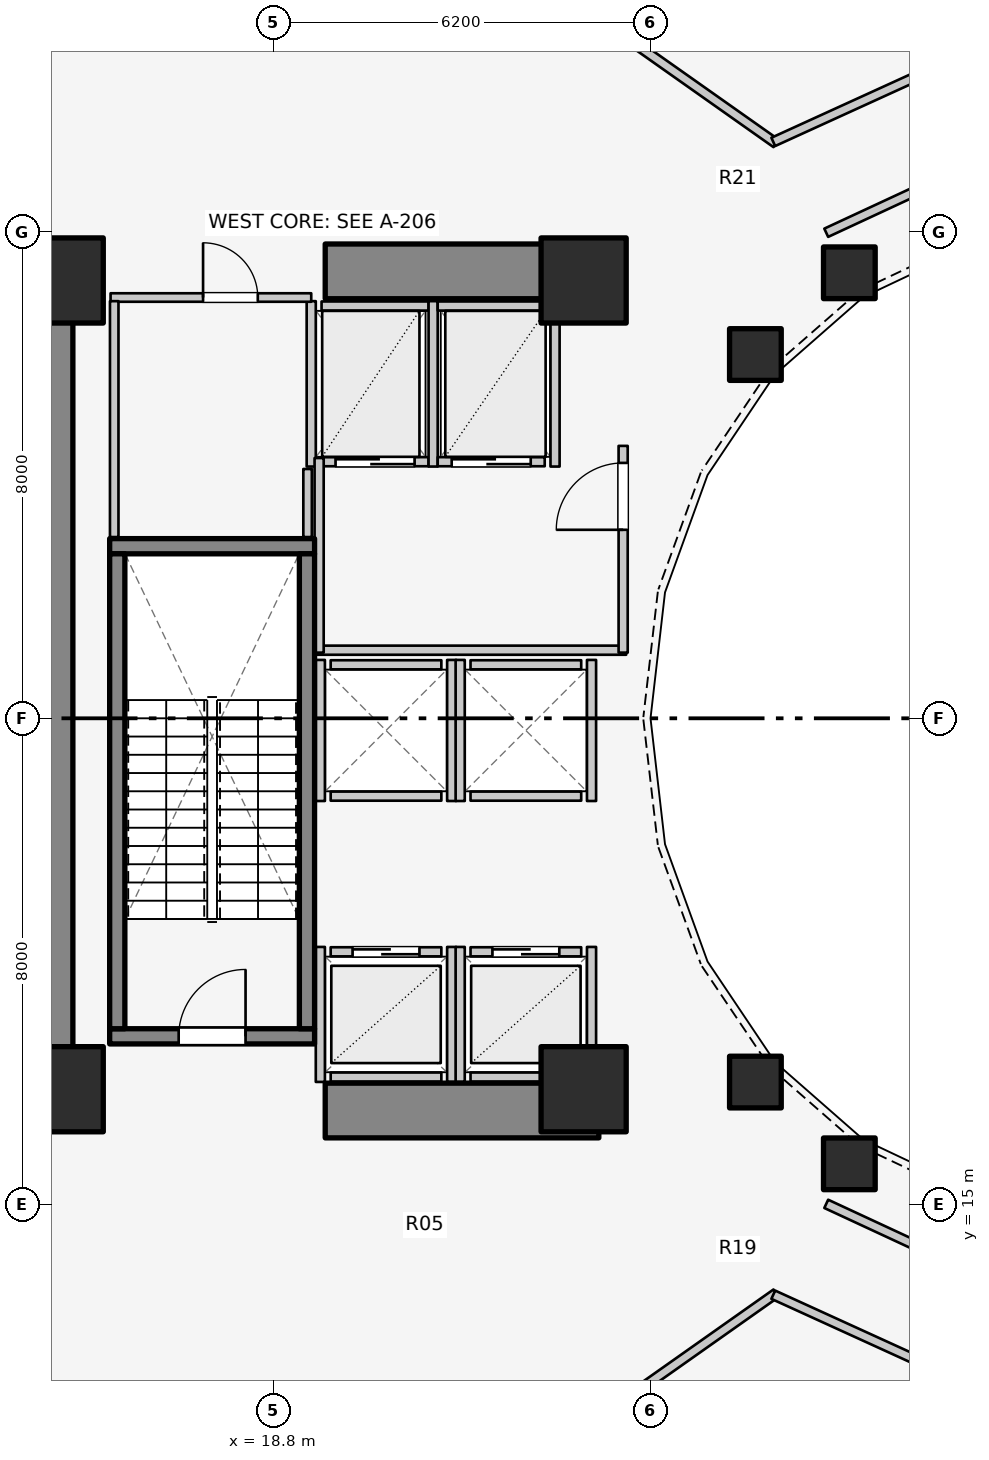
"""IFC4 building model, lengths in metres.
Left out: names, types, materials, properties, quantities, classifications, styles, units other than length and angle.
Written with IfcOpenShell. Run it as: python <this file> out.ifc"""

import sys

from ifc_helpers import new_model, si_unit, direction, frame, frame_2d, origin, origin_2d, place, context, subcontext, project, spatial, rectangle, extrude, element, fill, save


model = new_model("IFC4")
c1 = context("Model", 3, precision=1e-05, world=origin(), true_north=direction((0.0, 1.0)))
c2 = subcontext(c1, "Body", "Model", "MODEL_VIEW")
j1 = project(units=[si_unit("LENGTHUNIT", "METRE"), si_unit("PLANEANGLEUNIT", "RADIAN")], contexts=[c1])
p1 = place(None, origin())
s1 = spatial("IfcSite", under=j1, at=p1, CompositionType="ELEMENT")
p2 = place(p1, origin())
s2 = spatial("IfcBuilding", under=s1, at=p2, CompositionType="ELEMENT")
p3 = place(p2, frame((0.0, 0.0, 69.0)))
s3 = spatial("IfcBuildingStorey", under=s2, at=p3, CompositionType="ELEMENT", Elevation=69.0)
p4 = place(p3, frame((15.05, 17.05, 0.0), z_axis=(0.0, 0.0, 1.0), x_axis=(0.0, 1.0, 0.0)))
e1 = element("IfcWall", 1, at=p4, inside=s3, PredefinedType="SHEAR", context=c2, shape_type="SweptSolid", body=[
    extrude(rectangle(XDim=12.8, YDim=0.9, at=frame_2d((6.4, 0.0))), origin(), (0.0, 0.0, 1.0), 4.2),
])
for number, where, z_axis, x_axis in (
    (2, (19.65, 16.55, 0.0), (0.0, 0.0, 1.0), (1.0, 0.0, 0.0)),
    (3, (19.65, 30.35, 0.0), (0.0, 0.0, 1.0), (1.0, 0.0, 0.0)),
):
    element("IfcWall", number, at=place(p3, frame(where, z_axis=z_axis, x_axis=x_axis)), inside=s3, PredefinedType="SHEAR", context=c2, shape_type="SweptSolid", body=[
        extrude(rectangle(XDim=4.5, YDim=0.9, at=frame_2d((2.25, 0.0))), origin(), (0.0, 0.0, 1.0), 4.2),
    ])
p5 = place(p3, frame((16.105, 17.77, 0.0), z_axis=(0.0, 0.0, 1.0), x_axis=(1.0, 0.0, 0.0)))
e4 = element("IfcWall", 4, at=p5, inside=s3, PredefinedType="SOLIDWALL", context=c2, shape_type="SweptSolid", body=[
    extrude(rectangle(XDim=3.37, YDim=0.25, at=frame_2d((1.685, 0.0))), origin(), (0.0, 0.0, 1.0), 4.2),
])
p6 = place(p5, frame((1.135, 0.0, 0.0)))
e5 = element("IfcOpeningElement", 5, at=p6, cuts=e4, PredefinedType="OPENING", context=c2, shape_type="SweptSolid", body=[
    extrude(rectangle(XDim=1.1, YDim=2.1, at=frame_2d((0.55, 1.05))), frame((0.0, 0.135, 0.0), z_axis=(0.0, -1.0, 0.0), x_axis=(1.0, 0.0, 0.0)), (0.0, 0.0, 1.0), 0.27),
])
p7 = place(p3, frame((16.105, 25.83, 0.0), z_axis=(0.0, 0.0, 1.0), x_axis=(1.0, 0.0, 0.0)))
e6 = element("IfcWall", 6, at=p7, inside=s3, PredefinedType="SOLIDWALL", context=c2, shape_type="SweptSolid", body=[
    extrude(rectangle(XDim=3.37, YDim=0.25, at=frame_2d((1.685, 0.0))), origin(), (0.0, 0.0, 1.0), 4.2),
])
for number, where, z_axis, x_axis in (
    (7, (16.23, 17.895, 0.0), (0.0, 0.0, 1.0), (0.0, 1.0, 0.0)),
    (8, (19.35, 17.895, 0.0), (0.0, 0.0, 1.0), (0.0, 1.0, 0.0)),
):
    element("IfcWall", number, at=place(p3, frame(where, z_axis=z_axis, x_axis=x_axis)), inside=s3, PredefinedType="SOLIDWALL", context=c2, shape_type="SweptSolid", body=[
        extrude(rectangle(XDim=7.81, YDim=0.25, at=frame_2d((3.905, 0.0))), origin(), (0.0, 0.0, 1.0), 4.2),
    ])
for number, where, z_axis, x_axis in (
    (9, (15.3, 16.9, 0.0), (0.0, 0.0, 1.0), (1.0, 0.0, 0.0)),
    (10, (23.9, 16.9, 0.0), (0.0, 0.0, 1.0), (1.0, 0.0, 0.0)),
    (11, (23.9, 30.2, 0.0), (0.0, 0.0, 1.0), (1.0, 0.0, 0.0)),
    (12, (15.3, 30.2, 0.0), (0.0, 0.0, 1.0), (1.0, 0.0, 0.0)),
):
    element("IfcColumn", number, at=place(p3, frame(where, z_axis=z_axis, x_axis=x_axis)), inside=s3, PredefinedType="COLUMN", context=c2, shape_type="SweptSolid", body=[
        extrude(rectangle(XDim=1.4, YDim=1.4, at=origin_2d()), origin(), (0.0, 0.0, 1.0), 4.2),
    ])
for number, where, z_axis, x_axis in (
    (13, (28.27, 30.327, 0.0), (0.0, 0.0, 1.0), (1.0, 0.0, 0.0)),
    (14, (26.725, 28.982, 0.0), (0.0, 0.0, 1.0), (1.0, 0.0, 0.0)),
    (15, (26.725, 17.018, 0.0), (0.0, 0.0, 1.0), (1.0, 0.0, 0.0)),
    (16, (28.27, 15.673, 0.0), (0.0, 0.0, 1.0), (1.0, 0.0, 0.0)),
):
    element("IfcColumn", number, at=place(p3, frame(where, z_axis=z_axis, x_axis=x_axis)), inside=s3, PredefinedType="COLUMN", context=c2, shape_type="SweptSolid", body=[
        extrude(rectangle(XDim=0.85, YDim=0.85, at=origin_2d()), origin(), (0.0, 0.0, 1.0), 4.2),
    ])
p8 = place(p3, frame((19.74, 19.16, 0.0), z_axis=(0.0, 0.0, 1.0), x_axis=(1.0, 0.0, 0.0)))
e17 = element("IfcWall", 17, at=p8, inside=s3, PredefinedType="SOLIDWALL", context=c2, shape_type="SweptSolid", body=[
    extrude(rectangle(XDim=1.82, YDim=0.15, at=frame_2d((0.91, 0.0))), origin(), (0.0, 0.0, 1.0), 3.675),
])
p9 = place(p8, frame((0.36, 0.0, 0.0)))
e18 = element("IfcOpeningElement", 18, at=p9, cuts=e17, PredefinedType="OPENING", context=c2, shape_type="SweptSolid", body=[
    extrude(rectangle(XDim=1.1, YDim=2.1, at=frame_2d((0.55, 1.05))), frame((0.0, 0.085, 0.0), z_axis=(0.0, -1.0, 0.0), x_axis=(1.0, 0.0, 0.0)), (0.0, 0.0, 1.0), 0.17),
])
p10 = place(p3, frame((19.74, 17.1, 0.0), z_axis=(0.0, 0.0, 1.0), x_axis=(1.0, 0.0, 0.0)))
e19 = element("IfcWall", 19, at=p10, inside=s3, PredefinedType="SOLIDWALL", context=c2, shape_type="SweptSolid", body=[
    extrude(rectangle(XDim=1.82, YDim=0.15, at=frame_2d((0.91, 0.0))), origin(), (0.0, 0.0, 1.0), 3.675),
])
p11 = place(p3, frame((19.57, 17.02, 0.0), z_axis=(0.0, 0.0, 1.0), x_axis=(0.0, 1.0, 0.0)))
e20 = element("IfcWall", 20, at=p11, inside=s3, PredefinedType="SOLIDWALL", context=c2, shape_type="SweptSolid", body=[
    extrude(rectangle(XDim=2.22, YDim=0.15, at=frame_2d((1.11, 0.0))), origin(), (0.0, 0.0, 1.0), 3.22),
])
p12 = place(p3, frame((21.73, 17.02, 0.0), z_axis=(0.0, 0.0, 1.0), x_axis=(0.0, 1.0, 0.0)))
e21 = element("IfcWall", 21, at=p12, inside=s3, PredefinedType="SOLIDWALL", context=c2, shape_type="SweptSolid", body=[
    extrude(rectangle(XDim=2.22, YDim=0.15, at=frame_2d((1.11, 0.0))), origin(), (0.0, 0.0, 1.0), 3.675),
])
p13 = place(p3, frame((22.04, 19.16, 0.0), z_axis=(0.0, 0.0, 1.0), x_axis=(1.0, 0.0, 0.0)))
e22 = element("IfcWall", 22, at=p13, inside=s3, PredefinedType="SOLIDWALL", context=c2, shape_type="SweptSolid", body=[
    extrude(rectangle(XDim=1.82, YDim=0.15, at=frame_2d((0.91, 0.0))), origin(), (0.0, 0.0, 1.0), 3.22),
])
p14 = place(p13, frame((0.36, 0.0, 0.0)))
e23 = element("IfcOpeningElement", 23, at=p14, cuts=e22, PredefinedType="OPENING", context=c2, shape_type="SweptSolid", body=[
    extrude(rectangle(XDim=1.1, YDim=2.1, at=frame_2d((0.55, 1.05))), frame((0.0, 0.085, 0.0), z_axis=(0.0, -1.0, 0.0), x_axis=(1.0, 0.0, 0.0)), (0.0, 0.0, 1.0), 0.17),
])
p15 = place(p3, frame((22.04, 17.1, 0.0), z_axis=(0.0, 0.0, 1.0), x_axis=(1.0, 0.0, 0.0)))
e24 = element("IfcWall", 24, at=p15, inside=s3, PredefinedType="SOLIDWALL", context=c2, shape_type="SweptSolid", body=[
    extrude(rectangle(XDim=1.82, YDim=0.15, at=frame_2d((0.91, 0.0))), origin(), (0.0, 0.0, 1.0), 3.22),
])
p16 = place(p3, frame((21.87, 17.02, 0.0), z_axis=(0.0, 0.0, 1.0), x_axis=(0.0, 1.0, 0.0)))
e25 = element("IfcWall", 25, at=p16, inside=s3, PredefinedType="SOLIDWALL", context=c2, shape_type="SweptSolid", body=[
    extrude(rectangle(XDim=2.22, YDim=0.15, at=frame_2d((1.11, 0.0))), origin(), (0.0, 0.0, 1.0), 3.675),
])
p17 = place(p3, frame((24.03, 17.02, 0.0), z_axis=(0.0, 0.0, 1.0), x_axis=(0.0, 1.0, 0.0)))
e26 = element("IfcWall", 26, at=p17, inside=s3, PredefinedType="SOLIDWALL", context=c2, shape_type="SweptSolid", body=[
    extrude(rectangle(XDim=2.22, YDim=0.15, at=frame_2d((1.11, 0.0))), origin(), (0.0, 0.0, 1.0), 2.973),
])
for number, where, z_axis, x_axis in (
    (27, (19.74, 21.72, 0.0), (0.0, 0.0, 1.0), (1.0, 0.0, 0.0)),
    (28, (19.74, 23.88, 0.0), (0.0, 0.0, 1.0), (1.0, 0.0, 0.0)),
):
    element("IfcWall", number, at=place(p3, frame(where, z_axis=z_axis, x_axis=x_axis)), inside=s3, PredefinedType="SOLIDWALL", context=c2, shape_type="SweptSolid", body=[
        extrude(rectangle(XDim=1.82, YDim=0.15, at=frame_2d((0.91, 0.0))), origin(), (0.0, 0.0, 1.0), 3.675),
    ])
for number, where, z_axis, x_axis in (
    (29, (19.57, 21.64, 0.0), (0.0, 0.0, 1.0), (0.0, 1.0, 0.0)),
    (30, (21.73, 21.64, 0.0), (0.0, 0.0, 1.0), (0.0, 1.0, 0.0)),
):
    element("IfcWall", number, at=place(p3, frame(where, z_axis=z_axis, x_axis=x_axis)), inside=s3, PredefinedType="SOLIDWALL", context=c2, shape_type="SweptSolid", body=[
        extrude(rectangle(XDim=2.32, YDim=0.15, at=frame_2d((1.16, 0.0))), origin(), (0.0, 0.0, 1.0), 3.675),
    ])
for number, where, z_axis, x_axis in (
    (31, (22.04, 21.72, 0.0), (0.0, 0.0, 1.0), (1.0, 0.0, 0.0)),
    (32, (22.04, 23.88, 0.0), (0.0, 0.0, 1.0), (1.0, 0.0, 0.0)),
):
    element("IfcWall", number, at=place(p3, frame(where, z_axis=z_axis, x_axis=x_axis)), inside=s3, PredefinedType="SOLIDWALL", context=c2, shape_type="SweptSolid", body=[
        extrude(rectangle(XDim=1.82, YDim=0.15, at=frame_2d((0.91, 0.0))), origin(), (0.0, 0.0, 1.0), 3.22),
    ])
p18 = place(p3, frame((21.87, 21.64, 0.0), z_axis=(0.0, 0.0, 1.0), x_axis=(0.0, 1.0, 0.0)))
e33 = element("IfcWall", 33, at=p18, inside=s3, PredefinedType="SOLIDWALL", context=c2, shape_type="SweptSolid", body=[
    extrude(rectangle(XDim=2.32, YDim=0.15, at=frame_2d((1.16, 0.0))), origin(), (0.0, 0.0, 1.0), 3.675),
])
p19 = place(p3, frame((24.03, 21.64, 0.0), z_axis=(0.0, 0.0, 1.0), x_axis=(0.0, 1.0, 0.0)))
e34 = element("IfcWall", 34, at=p19, inside=s3, PredefinedType="SOLIDWALL", context=c2, shape_type="SweptSolid", body=[
    extrude(rectangle(XDim=2.32, YDim=0.15, at=frame_2d((1.16, 0.0))), origin(), (0.0, 0.0, 1.0), 3.22),
])
p20 = place(p3, frame((19.59, 27.22, 0.0), z_axis=(0.0, 0.0, 1.0), x_axis=(1.0, 0.0, 0.0)))
e35 = element("IfcWall", 35, at=p20, inside=s3, PredefinedType="SOLIDWALL", context=c2, shape_type="SweptSolid", body=[
    extrude(rectangle(XDim=1.76, YDim=0.15, at=frame_2d((0.88, 0.0))), origin(), (0.0, 0.0, 1.0), 3.675),
])
p21 = place(p20, frame((0.23, 0.0, 0.0)))
e36 = element("IfcOpeningElement", 36, at=p21, cuts=e35, PredefinedType="OPENING", context=c2, shape_type="SweptSolid", body=[
    extrude(rectangle(XDim=1.3, YDim=2.1, at=frame_2d((0.65, 1.05))), frame((0.0, 0.085, 0.0), z_axis=(0.0, -1.0, 0.0), x_axis=(1.0, 0.0, 0.0)), (0.0, 0.0, 1.0), 0.17),
])
p22 = place(p3, frame((19.59, 29.78, 0.0), z_axis=(0.0, 0.0, 1.0), x_axis=(1.0, 0.0, 0.0)))
e37 = element("IfcWall", 37, at=p22, inside=s3, PredefinedType="SOLIDWALL", context=c2, shape_type="SweptSolid", body=[
    extrude(rectangle(XDim=1.76, YDim=0.15, at=frame_2d((0.88, 0.0))), origin(), (0.0, 0.0, 1.0), 3.675),
])
for number, where, z_axis, x_axis in (
    (38, (19.42, 27.14, 0.0), (0.0, 0.0, 1.0), (0.0, 1.0, 0.0)),
    (39, (21.425, 27.14, 0.0), (0.0, 0.0, 1.0), (0.0, 1.0, 0.0)),
):
    element("IfcWall", number, at=place(p3, frame(where, z_axis=z_axis, x_axis=x_axis)), inside=s3, PredefinedType="SOLIDWALL", context=c2, shape_type="SweptSolid", body=[
        extrude(rectangle(XDim=2.72, YDim=0.15, at=frame_2d((1.36, 0.0))), origin(), (0.0, 0.0, 1.0), 3.675),
    ])
p23 = place(p3, frame((21.5, 27.22, 0.0), z_axis=(0.0, 0.0, 1.0), x_axis=(1.0, 0.0, 0.0)))
e40 = element("IfcWall", 40, at=p23, inside=s3, PredefinedType="SOLIDWALL", context=c2, shape_type="SweptSolid", body=[
    extrude(rectangle(XDim=1.76, YDim=0.15, at=frame_2d((0.88, 0.0))), origin(), (0.0, 0.0, 1.0), 3.675),
])
p24 = place(p23, frame((0.23, 0.0, 0.0)))
e41 = element("IfcOpeningElement", 41, at=p24, cuts=e40, PredefinedType="OPENING", context=c2, shape_type="SweptSolid", body=[
    extrude(rectangle(XDim=1.3, YDim=2.1, at=frame_2d((0.65, 1.05))), frame((0.0, 0.085, 0.0), z_axis=(0.0, -1.0, 0.0), x_axis=(1.0, 0.0, 0.0)), (0.0, 0.0, 1.0), 0.17),
])
p25 = place(p3, frame((21.5, 29.78, 0.0), z_axis=(0.0, 0.0, 1.0), x_axis=(1.0, 0.0, 0.0)))
e42 = element("IfcWall", 42, at=p25, inside=s3, PredefinedType="SOLIDWALL", context=c2, shape_type="SweptSolid", body=[
    extrude(rectangle(XDim=1.76, YDim=0.15, at=frame_2d((0.88, 0.0))), origin(), (0.0, 0.0, 1.0), 3.675),
])
p26 = place(p3, frame((23.43, 27.14, 0.0), z_axis=(0.0, 0.0, 1.0), x_axis=(0.0, 1.0, 0.0)))
e43 = element("IfcWall", 43, at=p26, inside=s3, PredefinedType="SOLIDWALL", context=c2, shape_type="SweptSolid", body=[
    extrude(rectangle(XDim=2.72, YDim=0.15, at=frame_2d((1.36, 0.0))), origin(), (0.0, 0.0, 1.0), 3.675),
])
p27 = place(p3, frame((19.52, 24.12, 0.0), z_axis=(0.0, 0.0, 1.0), x_axis=(1.0, 0.0, 0.0)))
e44 = element("IfcWall", 44, at=p27, inside=s3, PredefinedType="PARTITIONING", context=c2, shape_type="SweptSolid", body=[
    extrude(rectangle(XDim=5.08, YDim=0.15, at=frame_2d((2.54, 0.0))), origin(), (0.0, 0.0, 1.0), 3.22),
])
p28 = place(p3, frame((19.55, 24.08, 0.0), z_axis=(0.0, 0.0, 1.0), x_axis=(0.0, 1.0, 0.0)))
e45 = element("IfcWall", 45, at=p28, inside=s3, PredefinedType="PARTITIONING", context=c2, shape_type="SweptSolid", body=[
    extrude(rectangle(XDim=3.2, YDim=0.15, at=frame_2d((1.6, 0.0))), origin(), (0.0, 0.0, 1.0), 3.675),
])
p29 = place(p3, frame((24.55, 24.08, 0.0), z_axis=(0.0, 0.0, 1.0), x_axis=(0.0, 1.0, 0.0)))
e46 = element("IfcWall", 46, at=p29, inside=s3, PredefinedType="PARTITIONING", context=c2, shape_type="SweptSolid", body=[
    extrude(rectangle(XDim=3.4, YDim=0.15, at=frame_2d((1.7, 0.0))), origin(), (0.0, 0.0, 1.0), 3.675),
])
p30 = place(p29, frame((2.02, 0.0, 0.0)))
e47 = element("IfcOpeningElement", 47, at=p30, cuts=e46, PredefinedType="OPENING", context=c2, shape_type="SweptSolid", body=[
    extrude(rectangle(XDim=1.1, YDim=2.1, at=frame_2d((0.55, 1.05))), frame((0.0, 0.085, 0.0), z_axis=(0.0, -1.0, 0.0), x_axis=(1.0, 0.0, 0.0)), (0.0, 0.0, 1.0), 0.17),
])
for number, where, z_axis, x_axis in (
    (48, (29.873, 31.906, 0.0), (0.0, 0.0, 1.0), (-0.907, -0.421, 0.0)),
    (49, (27.89, 15.015, 0.0), (0.0, 0.0, 1.0), (0.907, -0.421, 0.0)),
):
    element("IfcWall", number, at=place(p3, frame(where, z_axis=z_axis, x_axis=x_axis)), inside=s3, PredefinedType="PARTITIONING", context=c2, shape_type="SweptSolid", body=[
        extrude(rectangle(XDim=2.186, YDim=0.15, at=frame_2d((1.093, 0.0))), origin(), (0.0, 0.0, 1.0), 2.32),
    ])
p31 = place(p3, frame((27.066, 32.454, 0.0), z_axis=(0.0, 0.0, 1.0), x_axis=(-0.817064271391, 0.576546595182, 0.0)))
e50 = element("IfcWall", 50, at=p31, inside=s3, PredefinedType="PARTITIONING", context=c2, shape_type="SweptSolid", body=[
    extrude(rectangle(XDim=9.614, YDim=0.15, at=frame_2d((4.807, 0.0))), origin(), (0.0, 0.0, 1.0), 2.32),
])
p32 = place(p3, frame((29.427, 33.577, 0.0), z_axis=(0.0, 0.0, 1.0), x_axis=(-0.909819048293, -0.415005179923, 0.0)))
e51 = element("IfcWall", 51, at=p32, inside=s3, PredefinedType="PARTITIONING", context=c2, shape_type="SweptSolid", body=[
    extrude(rectangle(XDim=2.646, YDim=0.15, at=frame_2d((1.323, 0.0))), origin(), (0.0, 0.0, 1.0), 2.32),
])
p33 = place(p3, frame((27.066, 13.546, 0.0), z_axis=(0.0, 0.0, 1.0), x_axis=(-0.817064271391, -0.576546595182, 0.0)))
e52 = element("IfcWall", 52, at=p33, inside=s3, PredefinedType="PARTITIONING", context=c2, shape_type="SweptSolid", body=[
    extrude(rectangle(XDim=9.614, YDim=0.15, at=frame_2d((4.807, 0.0))), origin(), (0.0, 0.0, 1.0), 2.32),
])
p34 = place(p3, frame((27.019, 13.521, 0.0), z_axis=(0.0, 0.0, 1.0), x_axis=(0.909819048293, -0.415005179923, 0.0)))
e53 = element("IfcWall", 53, at=p34, inside=s3, PredefinedType="PARTITIONING", context=c2, shape_type="SweptSolid", body=[
    extrude(rectangle(XDim=2.646, YDim=0.15, at=frame_2d((1.323, 0.0))), origin(), (0.0, 0.0, 1.0), 2.32),
])
p35 = place(p3, frame((16.12, 29.92, 0.0), z_axis=(0.0, 0.0, 1.0), x_axis=(1.0, 0.0, 0.0)))
e54 = element("IfcWall", 54, at=p35, inside=s3, PredefinedType="PLUMBINGWALL", context=c2, shape_type="SweptSolid", body=[
    extrude(rectangle(XDim=3.3, YDim=0.14, at=frame_2d((1.65, 0.0))), origin(), (0.0, 0.0, 1.0), 3.675),
])
p36 = place(p35, frame((1.521, 0.0, 0.0)))
e55 = element("IfcOpeningElement", 55, at=p36, cuts=e54, PredefinedType="OPENING", context=c2, shape_type="SweptSolid", body=[
    extrude(rectangle(XDim=0.9, YDim=2.1, at=frame_2d((0.45, 1.05))), frame((0.0, 0.08, 0.0), z_axis=(0.0, -1.0, 0.0), x_axis=(1.0, 0.0, 0.0)), (0.0, 0.0, 1.0), 0.16),
])
p37 = place(p3, frame((16.18, 25.98, 0.0), z_axis=(0.0, 0.0, 1.0), x_axis=(0.0, 1.0, 0.0)))
e56 = element("IfcWall", 56, at=p37, inside=s3, PredefinedType="PLUMBINGWALL", context=c2, shape_type="SweptSolid", body=[
    extrude(rectangle(XDim=3.88, YDim=0.14, at=frame_2d((1.94, 0.0))), origin(), (0.0, 0.0, 1.0), 3.675),
])
p38 = place(p3, frame((19.36, 25.98, 0.0), z_axis=(0.0, 0.0, 1.0), x_axis=(0.0, 1.0, 0.0)))
e57 = element("IfcWall", 57, at=p38, inside=s3, PredefinedType="PLUMBINGWALL", context=c2, shape_type="SweptSolid", body=[
    extrude(rectangle(XDim=1.12, YDim=0.14, at=frame_2d((0.56, 0.0))), origin(), (0.0, 0.0, 1.0), 3.675),
])
p39 = place(p6, origin())
e58 = element("IfcDoor", 58, at=p39, inside=s3, OperationType="SINGLE_SWING_RIGHT", PredefinedType="DOOR", context=c2, shape_type="SweptSolid", body=[
    extrude(rectangle(XDim=1.1, YDim=2.1, at=frame_2d((0.55, 1.05))), frame((0.0, 0.025, 0.0), z_axis=(0.0, -1.0, 0.0), x_axis=(1.0, 0.0, 0.0)), (0.0, 0.0, 1.0), 0.05),
])
fill(e5, e58)
p40 = place(p9, origin())
e59 = element("IfcDoor", 59, at=p40, inside=s3, OperationType="DOUBLE_DOOR_SLIDING", PredefinedType="DOOR", context=c2, shape_type="SweptSolid", body=[
    extrude(rectangle(XDim=1.1, YDim=2.1, at=frame_2d((0.55, 1.05))), frame((0.0, 0.025, 0.0), z_axis=(0.0, -1.0, 0.0), x_axis=(1.0, 0.0, 0.0)), (0.0, 0.0, 1.0), 0.05),
])
fill(e18, e59)
p41 = place(p14, origin())
e60 = element("IfcDoor", 60, at=p41, inside=s3, OperationType="DOUBLE_DOOR_SLIDING", PredefinedType="DOOR", context=c2, shape_type="SweptSolid", body=[
    extrude(rectangle(XDim=1.1, YDim=2.1, at=frame_2d((0.55, 1.05))), frame((0.0, 0.025, 0.0), z_axis=(0.0, -1.0, 0.0), x_axis=(1.0, 0.0, 0.0)), (0.0, 0.0, 1.0), 0.05),
])
fill(e23, e60)
p42 = place(p21, origin())
e61 = element("IfcDoor", 61, at=p42, inside=s3, OperationType="DOUBLE_DOOR_SLIDING", PredefinedType="DOOR", context=c2, shape_type="SweptSolid", body=[
    extrude(rectangle(XDim=1.3, YDim=2.1, at=frame_2d((0.65, 1.05))), frame((0.0, 0.025, 0.0), z_axis=(0.0, -1.0, 0.0), x_axis=(1.0, 0.0, 0.0)), (0.0, 0.0, 1.0), 0.05),
])
fill(e36, e61)
p43 = place(p24, origin())
e62 = element("IfcDoor", 62, at=p43, inside=s3, OperationType="DOUBLE_DOOR_SLIDING", PredefinedType="DOOR", context=c2, shape_type="SweptSolid", body=[
    extrude(rectangle(XDim=1.3, YDim=2.1, at=frame_2d((0.65, 1.05))), frame((0.0, 0.025, 0.0), z_axis=(0.0, -1.0, 0.0), x_axis=(1.0, 0.0, 0.0)), (0.0, 0.0, 1.0), 0.05),
])
fill(e41, e62)
p44 = place(p30, origin())
e63 = element("IfcDoor", 63, at=p44, inside=s3, OperationType="SINGLE_SWING_LEFT", PredefinedType="DOOR", context=c2, shape_type="SweptSolid", body=[
    extrude(rectangle(XDim=1.1, YDim=2.1, at=frame_2d((0.55, 1.05))), frame((0.0, 0.025, 0.0), z_axis=(0.0, -1.0, 0.0), x_axis=(1.0, 0.0, 0.0)), (0.0, 0.0, 1.0), 0.05),
])
fill(e47, e63)
p45 = place(p36, origin())
e64 = element("IfcDoor", 64, at=p45, inside=s3, OperationType="SINGLE_SWING_LEFT", PredefinedType="DOOR", context=c2, shape_type="SweptSolid", body=[
    extrude(rectangle(XDim=0.9, YDim=2.1, at=frame_2d((0.45, 1.05))), frame((0.0, 0.025, 0.0), z_axis=(0.0, -1.0, 0.0), x_axis=(1.0, 0.0, 0.0)), (0.0, 0.0, 1.0), 0.05),
])
fill(e55, e64)
save(model, sys.argv[1])
